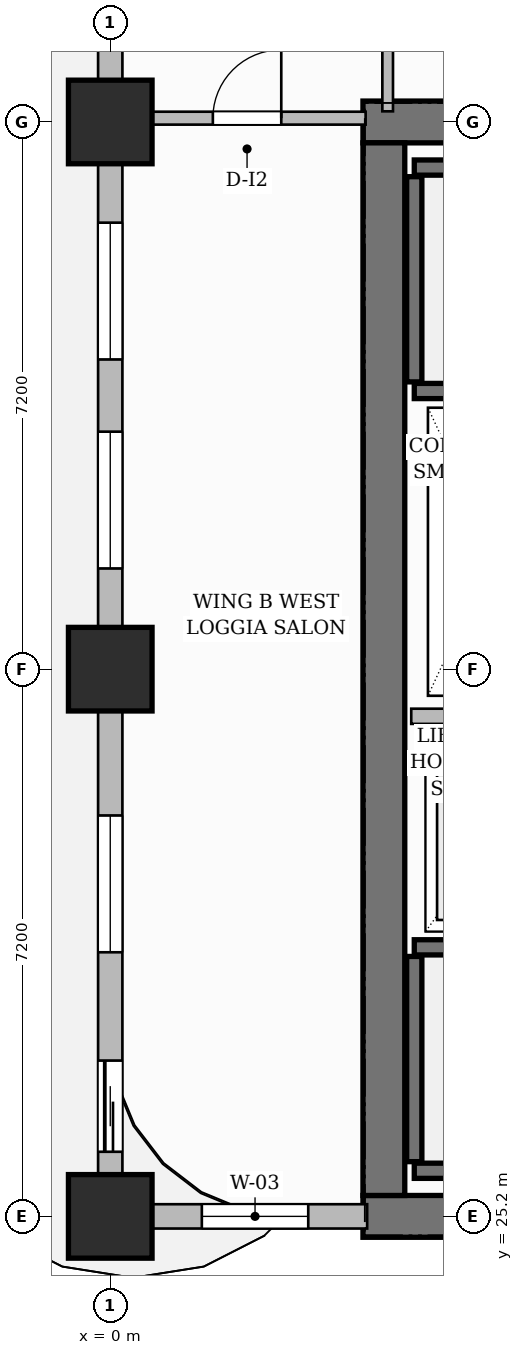
"""IFC4 building model, lengths in metres.
Left out: names, types, materials, properties, quantities, classifications, styles, units other than length and angle.
Written with IfcOpenShell. Run it as: python <this file> out.ifc"""

import sys

from ifc_helpers import new_model, si_unit, direction, frame, frame_2d, origin, origin_2d, place, context, subcontext, project, spatial, rectangle, extrude, source, transform, mapped, element, fill, save


model = new_model("IFC4")
c1 = context("Model", 3, precision=1e-05, world=origin(), true_north=direction((0.0, 1.0)))
c2 = subcontext(c1, "Body", "Model", "MODEL_VIEW")
j1 = project(units=[si_unit("LENGTHUNIT", "METRE"), si_unit("PLANEANGLEUNIT", "RADIAN")], contexts=[c1])
p1 = place(None, origin())
s1 = spatial("IfcSite", under=j1, at=p1, CompositionType="ELEMENT")
p2 = place(p1, origin())
s2 = spatial("IfcBuilding", under=s1, at=p2, CompositionType="ELEMENT")
p3 = place(p2, frame((0.0, 0.0, 91.6)))
s3 = spatial("IfcBuildingStorey", under=s2, at=p3, CompositionType="ELEMENT", Elevation=91.6)
for number, where, z_axis, x_axis in (
    (1, (3.325, 25.2, 0.0), (0.0, 0.0, 1.0), (1.0, 0.0, 0.0)),
    (2, (3.325, 39.6, 0.0), (0.0, 0.0, 1.0), (1.0, 0.0, 0.0)),
):
    element("IfcWall", number, at=place(p3, frame(where, z_axis=z_axis, x_axis=x_axis)), inside=s3, PredefinedType="SHEAR", context=c2, shape_type="SweptSolid", body=[
        extrude(rectangle(XDim=8.35, YDim=0.55, at=frame_2d((4.175, 0.0))), origin(), (0.0, 0.0, 1.0), 3.7),
    ])
p4 = place(p3, frame((3.6, 25.475, 0.0), z_axis=(0.0, 0.0, 1.0), x_axis=(0.0, 1.0, 0.0)))
e3 = element("IfcWall", 3, at=p4, inside=s3, PredefinedType="SHEAR", context=c2, shape_type="SweptSolid", body=[
    extrude(rectangle(XDim=13.85, YDim=0.55, at=frame_2d((6.925, 0.0))), origin(), (0.0, 0.0, 1.0), 3.7),
])
m1 = source(origin(), c2, "Body", "SweptSolid", [
    extrude(rectangle(XDim=1.1, YDim=1.1, at=origin_2d()), origin(), (0.0, 0.0, 1.0), 3.7),
])
for number, where, z_axis, x_axis in (
    (4, (0.0, 25.2, 0.0), (0.0, 0.0, 1.0), (1.0, 0.0, 0.0)),
    (5, (0.0, 32.4, 0.0), (0.0, 0.0, 1.0), (1.0, 0.0, 0.0)),
    (6, (0.0, 39.6, 0.0), (0.0, 0.0, 1.0), (1.0, 0.0, 0.0)),
):
    element("IfcColumn", number, at=place(p3, frame(where, z_axis=z_axis, x_axis=x_axis)), inside=s3, PredefinedType="COLUMN", context=c2, shape_type="MappedRepresentation", body=[
        mapped(m1, transform((0.0, 0.0, 0.0), scale=1.0)),
    ])
p5 = place(p3, frame((4.0, 25.8, 0.0), z_axis=(0.0, 0.0, 1.0), x_axis=(1.0, 0.0, 0.0)))
e7 = element("IfcWall", 7, at=p5, inside=s3, PredefinedType="SHEAR", context=c2, shape_type="SweptSolid", body=[
    extrude(rectangle(XDim=7.1, YDim=0.2, at=frame_2d((3.55, 0.0))), origin(), (0.0, 0.0, 1.0), 3.7),
])
p6 = place(p3, frame((4.0, 25.92, 0.0), z_axis=(0.0, 0.0, 1.0), x_axis=(0.0, 1.0, 0.0)))
e8 = element("IfcWall", 8, at=p6, inside=s3, PredefinedType="SHEAR", context=c2, shape_type="SweptSolid", body=[
    extrude(rectangle(XDim=2.7, YDim=0.2, at=frame_2d((1.35, 0.0))), origin(), (0.0, 0.0, 1.0), 3.7),
])
p7 = place(p3, frame((4.0, 28.74, 0.0), z_axis=(0.0, 0.0, 1.0), x_axis=(1.0, 0.0, 0.0)))
e9 = element("IfcWall", 9, at=p7, inside=s3, PredefinedType="SHEAR", context=c2, shape_type="SweptSolid", body=[
    extrude(rectangle(XDim=7.1, YDim=0.2, at=frame_2d((3.55, 0.0))), origin(), (0.0, 0.0, 1.0), 3.7),
])
p8 = place(p7, frame((5.815, 0.0, 0.0)))
e10 = element("IfcOpeningElement", 10, at=p8, cuts=e9, PredefinedType="OPENING", context=c2, shape_type="SweptSolid", body=[
    extrude(rectangle(XDim=1.05, YDim=2.2, at=frame_2d((0.525, 1.1))), frame((0.0, 0.11, 0.0), z_axis=(0.0, -1.0, 0.0), x_axis=(1.0, 0.0, 0.0)), (0.0, 0.0, 1.0), 0.22),
])
p9 = place(p3, frame((4.0, 39.0, 0.0), z_axis=(0.0, 0.0, 1.0), x_axis=(1.0, 0.0, 0.0)))
e11 = element("IfcWall", 11, at=p9, inside=s3, PredefinedType="SHEAR", context=c2, shape_type="SweptSolid", body=[
    extrude(rectangle(XDim=7.1, YDim=0.2, at=frame_2d((3.55, 0.0))), origin(), (0.0, 0.0, 1.0), 3.7),
])
p10 = place(p3, frame((4.0, 36.18, 0.0), z_axis=(0.0, 0.0, 1.0), x_axis=(0.0, 1.0, 0.0)))
e12 = element("IfcWall", 12, at=p10, inside=s3, PredefinedType="SHEAR", context=c2, shape_type="SweptSolid", body=[
    extrude(rectangle(XDim=2.7, YDim=0.2, at=frame_2d((1.35, 0.0))), origin(), (0.0, 0.0, 1.0), 3.7),
])
p11 = place(p3, frame((4.0, 36.06, 0.0), z_axis=(0.0, 0.0, 1.0), x_axis=(1.0, 0.0, 0.0)))
e13 = element("IfcWall", 13, at=p11, inside=s3, PredefinedType="SHEAR", context=c2, shape_type="SweptSolid", body=[
    extrude(rectangle(XDim=7.1, YDim=0.2, at=frame_2d((3.55, 0.0))), origin(), (0.0, 0.0, 1.0), 3.7),
])
p12 = place(p11, frame((5.815, 0.0, 0.0)))
e14 = element("IfcOpeningElement", 14, at=p12, cuts=e13, PredefinedType="OPENING", context=c2, shape_type="SweptSolid", body=[
    extrude(rectangle(XDim=1.05, YDim=2.2, at=frame_2d((0.525, 1.1))), frame((0.0, 0.11, 0.0), z_axis=(0.0, -1.0, 0.0), x_axis=(1.0, 0.0, 0.0)), (0.0, 0.0, 1.0), 0.22),
])
p13 = place(p3, frame((3.96, 31.78, 0.0), z_axis=(0.0, 0.0, 1.0), x_axis=(1.0, 0.0, 0.0)))
e15 = element("IfcWall", 15, at=p13, inside=s3, PredefinedType="PARTITIONING", context=c2, shape_type="SweptSolid", body=[
    extrude(rectangle(XDim=2.13, YDim=0.2, at=frame_2d((1.065, 0.0))), origin(), (0.0, 0.0, 1.0), 3.45),
])
p14 = place(p3, frame((0.24, 39.65, 0.0), z_axis=(0.0, 0.0, 1.0), x_axis=(1.0, 0.0, 0.0)))
e16 = element("IfcWall", 16, at=p14, inside=s3, PredefinedType="PARTITIONING", context=c2, shape_type="SweptSolid", body=[
    extrude(rectangle(XDim=3.12, YDim=0.17, at=frame_2d((1.56, 0.0))), origin(), (0.0, 0.0, 1.0), 3.45),
])
p15 = place(p14, frame((1.11, 0.0, 0.0)))
e17 = element("IfcOpeningElement", 17, at=p15, cuts=e16, PredefinedType="OPENING", context=c2, shape_type="SweptSolid", body=[
    extrude(rectangle(XDim=0.9, YDim=2.15, at=frame_2d((0.45, 1.075))), frame((0.0, 0.095, 0.0), z_axis=(0.0, -1.0, 0.0), x_axis=(1.0, 0.0, 0.0)), (0.0, 0.0, 1.0), 0.19),
])
p16 = place(p3, frame((3.65, 39.74, 0.0), z_axis=(0.0, 0.0, 1.0), x_axis=(0.0, 1.0, 0.0)))
e18 = element("IfcWall", 18, at=p16, inside=s3, PredefinedType="PARTITIONING", context=c2, shape_type="SweptSolid", body=[
    extrude(rectangle(XDim=1.745, YDim=0.14, at=frame_2d((0.873, 0.0))), origin(), (0.0, 0.0, 1.0), 3.45),
])
p17 = place(p3, frame((0.0, 25.2, 0.0), z_axis=(0.0, 0.0, 1.0), x_axis=(1.0, 0.0, 0.0)))
e19 = element("IfcWall", 19, at=p17, inside=s3, PredefinedType="SOLIDWALL", context=c2, shape_type="SweptSolid", body=[
    extrude(rectangle(XDim=3.38, YDim=0.32, at=frame_2d((1.69, 0.0))), origin(), (0.0, 0.0, 1.0), 3.45),
])
p18 = place(p17, frame((1.205, 0.0, 0.8)))
e20 = element("IfcOpeningElement", 20, at=p18, cuts=e19, PredefinedType="OPENING", context=c2, shape_type="SweptSolid", body=[
    extrude(rectangle(XDim=1.4, YDim=1.85, at=frame_2d((0.7, 0.925))), frame((0.0, 0.17, 0.0), z_axis=(0.0, -1.0, 0.0), x_axis=(1.0, 0.0, 0.0)), (0.0, 0.0, 1.0), 0.34),
])
p19 = place(p3, frame((0.0, 25.25, 0.0), z_axis=(0.0, 0.0, 1.0), x_axis=(0.0, 1.0, 0.0)))
e21 = element("IfcWall", 21, at=p19, inside=s3, PredefinedType="SOLIDWALL", context=c2, shape_type="SweptSolid", body=[
    extrude(rectangle(XDim=21.5, YDim=0.32, at=frame_2d((10.75, 0.0))), origin(), (0.0, 0.0, 1.0), 2.885),
])
p20 = place(p19, frame((18.607, 0.0, 0.0)))
e22 = element("IfcOpeningElement", 22, at=p20, cuts=e21, PredefinedType="OPENING", context=c2, shape_type="SweptSolid", body=[
    extrude(rectangle(XDim=1.2, YDim=2.2, at=frame_2d((0.6, 1.1))), frame((0.0, 0.17, 0.0), z_axis=(0.0, -1.0, 0.0), x_axis=(1.0, 0.0, 0.0)), (0.0, 0.0, 1.0), 0.34),
])
p21 = place(p19, frame((0.8, 0.0, 0.0)))
e23 = element("IfcOpeningElement", 23, at=p21, cuts=e21, PredefinedType="OPENING", context=c2, shape_type="SweptSolid", body=[
    extrude(rectangle(XDim=1.2, YDim=2.2, at=frame_2d((0.6, 1.1))), frame((0.0, 0.17, 0.0), z_axis=(0.0, -1.0, 0.0), x_axis=(1.0, 0.0, 0.0)), (0.0, 0.0, 1.0), 0.34),
])
p22 = place(p19, frame((3.425, 0.0, 0.8)))
e24 = element("IfcOpeningElement", 24, at=p22, cuts=e21, PredefinedType="OPENING", context=c2, shape_type="SweptSolid", body=[
    extrude(rectangle(XDim=1.8, YDim=1.85, at=frame_2d((0.9, 0.925))), frame((0.0, 0.17, 0.0), z_axis=(0.0, -1.0, 0.0), x_axis=(1.0, 0.0, 0.0)), (0.0, 0.0, 1.0), 0.34),
])
p23 = place(p19, frame((8.475, 0.0, 0.8)))
e25 = element("IfcOpeningElement", 25, at=p23, cuts=e21, PredefinedType="OPENING", context=c2, shape_type="SweptSolid", body=[
    extrude(rectangle(XDim=1.8, YDim=1.85, at=frame_2d((0.9, 0.925))), frame((0.0, 0.17, 0.0), z_axis=(0.0, -1.0, 0.0), x_axis=(1.0, 0.0, 0.0)), (0.0, 0.0, 1.0), 0.34),
])
p24 = place(p19, frame((11.225, 0.0, 0.8)))
e26 = element("IfcOpeningElement", 26, at=p24, cuts=e21, PredefinedType="OPENING", context=c2, shape_type="SweptSolid", body=[
    extrude(rectangle(XDim=1.8, YDim=1.85, at=frame_2d((0.9, 0.925))), frame((0.0, 0.17, 0.0), z_axis=(0.0, -1.0, 0.0), x_axis=(1.0, 0.0, 0.0)), (0.0, 0.0, 1.0), 0.34),
])
p25 = place(p19, frame((15.621, 0.0, 0.8)))
e27 = element("IfcOpeningElement", 27, at=p25, cuts=e21, PredefinedType="OPENING", context=c2, shape_type="SweptSolid", body=[
    extrude(rectangle(XDim=1.8, YDim=1.85, at=frame_2d((0.9, 0.925))), frame((0.0, 0.17, 0.0), z_axis=(0.0, -1.0, 0.0), x_axis=(1.0, 0.0, 0.0)), (0.0, 0.0, 1.0), 0.34),
])
m2 = source(origin(), c2, "Body", "SweptSolid", [
    extrude(rectangle(XDim=0.9, YDim=2.15, at=frame_2d((0.45, 1.075))), frame((0.0, 0.025, 0.0), z_axis=(0.0, -1.0, 0.0), x_axis=(1.0, 0.0, 0.0)), (0.0, 0.0, 1.0), 0.05),
])
p26 = place(p15, origin())
e28 = element("IfcDoor", 28, at=p26, inside=s3, OperationType="SINGLE_SWING_RIGHT", PredefinedType="DOOR", context=c2, shape_type="MappedRepresentation", body=[
    mapped(m2, transform((0.0, 0.0, 0.0), scale=1.0)),
])
fill(e17, e28)
m3 = source(origin(), c2, "Body", "SweptSolid", [
    extrude(rectangle(XDim=1.2, YDim=2.2, at=frame_2d((0.6, 1.1))), frame((0.0, 0.025, 0.0), z_axis=(0.0, -1.0, 0.0), x_axis=(1.0, 0.0, 0.0)), (0.0, 0.0, 1.0), 0.05),
])
p27 = place(p21, origin())
e29 = element("IfcDoor", 29, at=p27, inside=s3, OperationType="SLIDING_TO_LEFT", PredefinedType="DOOR", context=c2, shape_type="MappedRepresentation", body=[
    mapped(m3, transform((0.0, 0.0, 0.0), scale=1.0)),
])
fill(e23, e29)
m4 = source(origin(), c2, "Body", "SweptSolid", [
    extrude(rectangle(XDim=1.4, YDim=1.85, at=frame_2d((0.7, 0.925))), frame((0.0, 0.03, 0.0), z_axis=(0.0, -1.0, 0.0), x_axis=(1.0, 0.0, 0.0)), (0.0, 0.0, 1.0), 0.06),
])
p28 = place(p18, origin())
e30 = element("IfcWindow", 30, at=p28, inside=s3, PartitioningType="SINGLE_PANEL", PredefinedType="WINDOW", context=c2, shape_type="MappedRepresentation", body=[
    mapped(m4, transform((0.0, 0.0, 0.0), scale=1.0)),
])
fill(e20, e30)
m5 = source(origin(), c2, "Body", "SweptSolid", [
    extrude(rectangle(XDim=1.8, YDim=1.85, at=frame_2d((0.9, 0.925))), frame((0.0, 0.03, 0.0), z_axis=(0.0, -1.0, 0.0), x_axis=(1.0, 0.0, 0.0)), (0.0, 0.0, 1.0), 0.06),
])
p29 = place(p22, origin())
e31 = element("IfcWindow", 31, at=p29, inside=s3, PartitioningType="DOUBLE_PANEL_VERTICAL", PredefinedType="WINDOW", context=c2, shape_type="MappedRepresentation", body=[
    mapped(m5, transform((0.0, 0.0, 0.0), scale=1.0)),
])
fill(e24, e31)
p30 = place(p23, origin())
e32 = element("IfcWindow", 32, at=p30, inside=s3, PartitioningType="DOUBLE_PANEL_VERTICAL", PredefinedType="WINDOW", context=c2, shape_type="MappedRepresentation", body=[
    mapped(m5, transform((0.0, 0.0, 0.0), scale=1.0)),
])
fill(e25, e32)
p31 = place(p24, origin())
e33 = element("IfcWindow", 33, at=p31, inside=s3, PartitioningType="DOUBLE_PANEL_VERTICAL", PredefinedType="WINDOW", context=c2, shape_type="MappedRepresentation", body=[
    mapped(m5, transform((0.0, 0.0, 0.0), scale=1.0)),
])
fill(e26, e33)
save(model, sys.argv[1])
